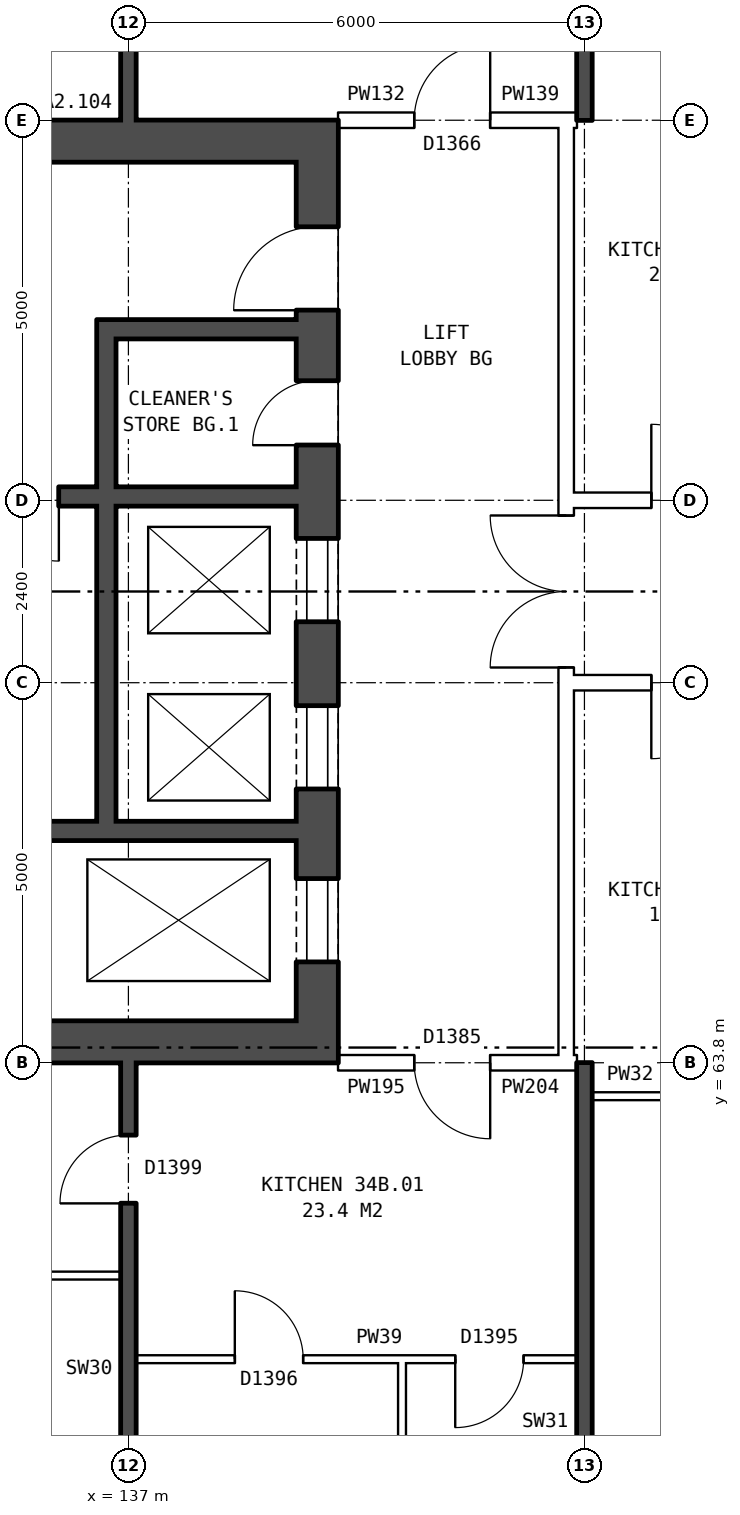
"""IFC4 building model, lengths in metres.
Left out: names, types, materials, properties, quantities, classifications, styles, units other than length and angle.
Written with IfcOpenShell. Run it as: python <this file> out.ifc"""

import sys

from ifc_helpers import new_model, si_unit, direction, frame, frame_2d, origin, place, context, subcontext, project, spatial, rectangle, extrude, element, fill, save


model = new_model("IFC4")
c1 = context("Model", 3, precision=1e-05, world=origin(), true_north=direction((0.0, 1.0)))
c2 = subcontext(c1, "Body", "Model", "MODEL_VIEW")
j1 = project(units=[si_unit("LENGTHUNIT", "METRE"), si_unit("PLANEANGLEUNIT", "RADIAN")], contexts=[c1])
p1 = place(None, origin())
s1 = spatial("IfcSite", under=j1, at=p1, CompositionType="ELEMENT")
p2 = place(p1, origin())
s2 = spatial("IfcBuilding", under=s1, at=p2, CompositionType="ELEMENT")
p3 = place(p2, frame((0.0, 0.0, 123.7)))
s3 = spatial("IfcBuildingStorey", under=s2, at=p3, CompositionType="ELEMENT", Elevation=123.7)
p4 = place(p3, frame((139.485, 63.8, 0.0), z_axis=(0.0, 0.0, 1.0), x_axis=(0.0, 1.0, 0.0)))
e1 = element("IfcWall", 1, at=p4, inside=s3, PredefinedType="SHEAR", context=c2, shape_type="SweptSolid", body=[
    extrude(rectangle(XDim=12.4, YDim=0.55, at=frame_2d((6.2, 0.0))), origin(), (0.0, 0.0, 1.0), 2.85),
])
p5 = place(p4, frame((1.325, 0.0, 0.0)))
e2 = element("IfcOpeningElement", 2, at=p5, cuts=e1, PredefinedType="OPENING", context=c2, shape_type="SweptSolid", body=[
    extrude(rectangle(XDim=1.1, YDim=2.1, at=frame_2d((0.55, 1.05))), frame((0.0, 0.285, 0.0), z_axis=(0.0, -1.0, 0.0), x_axis=(1.0, 0.0, 0.0)), (0.0, 0.0, 1.0), 0.57),
])
p6 = place(p4, frame((3.6, 0.0, 0.0)))
e3 = element("IfcOpeningElement", 3, at=p6, cuts=e1, PredefinedType="OPENING", context=c2, shape_type="SweptSolid", body=[
    extrude(rectangle(XDim=1.1, YDim=2.1, at=frame_2d((0.55, 1.05))), frame((0.0, 0.285, 0.0), z_axis=(0.0, -1.0, 0.0), x_axis=(1.0, 0.0, 0.0)), (0.0, 0.0, 1.0), 0.57),
])
p7 = place(p4, frame((5.8, 0.0, 0.0)))
e4 = element("IfcOpeningElement", 4, at=p7, cuts=e1, PredefinedType="OPENING", context=c2, shape_type="SweptSolid", body=[
    extrude(rectangle(XDim=1.1, YDim=2.1, at=frame_2d((0.55, 1.05))), frame((0.0, 0.285, 0.0), z_axis=(0.0, -1.0, 0.0), x_axis=(1.0, 0.0, 0.0)), (0.0, 0.0, 1.0), 0.57),
])
p8 = place(p4, frame((9.9, 0.0, 0.0)))
e5 = element("IfcOpeningElement", 5, at=p8, cuts=e1, PredefinedType="OPENING", context=c2, shape_type="SweptSolid", body=[
    extrude(rectangle(XDim=1.1, YDim=2.1, at=frame_2d((0.55, 1.05))), frame((0.0, 0.285, 0.0), z_axis=(0.0, -1.0, 0.0), x_axis=(1.0, 0.0, 0.0)), (0.0, 0.0, 1.0), 0.57),
])
p9 = place(p4, frame((8.125, 0.0, 0.0)))
e6 = element("IfcOpeningElement", 6, at=p9, cuts=e1, PredefinedType="OPENING", context=c2, shape_type="SweptSolid", body=[
    extrude(rectangle(XDim=0.85, YDim=2.1, at=frame_2d((0.425, 1.05))), frame((0.0, 0.285, 0.0), z_axis=(0.0, -1.0, 0.0), x_axis=(1.0, 0.0, 0.0)), (0.0, 0.0, 1.0), 0.57),
])
for number, where, z_axis, x_axis in (
    (7, (139.21, 64.075, 0.0), (0.0, 0.0, 1.0), (-1.0, 0.0, 0.0)),
    (8, (139.21, 75.925, 0.0), (0.0, 0.0, 1.0), (-1.0, 0.0, 0.0)),
):
    element("IfcWall", number, at=place(p3, frame(where, z_axis=z_axis, x_axis=x_axis)), inside=s3, PredefinedType="SHEAR", context=c2, shape_type="SweptSolid", body=[
        extrude(rectangle(XDim=7.3, YDim=0.55, at=frame_2d((3.65, 0.0))), origin(), (0.0, 0.0, 1.0), 2.85),
    ])
p10 = place(p3, frame((139.21, 66.85, 0.0), z_axis=(0.0, 0.0, 1.0), x_axis=(-1.0, 0.0, 0.0)))
e9 = element("IfcWall", 9, at=p10, inside=s3, PredefinedType="SHEAR", context=c2, shape_type="SweptSolid", body=[
    extrude(rectangle(XDim=4.475, YDim=0.25, at=frame_2d((2.237, 0.0))), origin(), (0.0, 0.0, 1.0), 2.85),
])
p11 = place(p3, frame((139.21, 71.25, 0.0), z_axis=(0.0, 0.0, 1.0), x_axis=(-1.0, 0.0, 0.0)))
e10 = element("IfcWall", 10, at=p11, inside=s3, PredefinedType="SHEAR", context=c2, shape_type="SweptSolid", body=[
    extrude(rectangle(XDim=7.3, YDim=0.25, at=frame_2d((3.65, 0.0))), origin(), (0.0, 0.0, 1.0), 2.85),
])
p12 = place(p11, frame((4.875, 0.0, 0.0)))
e11 = element("IfcOpeningElement", 11, at=p12, cuts=e10, PredefinedType="OPENING", context=c2, shape_type="SweptSolid", body=[
    extrude(rectangle(XDim=1.1, YDim=2.1, at=frame_2d((0.55, 1.05))), frame((0.0, 0.135, 0.0), z_axis=(0.0, -1.0, 0.0), x_axis=(1.0, 0.0, 0.0)), (0.0, 0.0, 1.0), 0.27),
])
p13 = place(p11, frame((3.125, 0.0, 0.0)))
e12 = element("IfcOpeningElement", 12, at=p13, cuts=e10, PredefinedType="OPENING", context=c2, shape_type="SweptSolid", body=[
    extrude(rectangle(XDim=0.85, YDim=2.1, at=frame_2d((0.425, 1.05))), frame((0.0, 0.135, 0.0), z_axis=(0.0, -1.0, 0.0), x_axis=(1.0, 0.0, 0.0)), (0.0, 0.0, 1.0), 0.27),
])
p14 = place(p3, frame((139.21, 73.45, 0.0), z_axis=(0.0, 0.0, 1.0), x_axis=(-1.0, 0.0, 0.0)))
e13 = element("IfcWall", 13, at=p14, inside=s3, PredefinedType="SHEAR", context=c2, shape_type="SweptSolid", body=[
    extrude(rectangle(XDim=2.375, YDim=0.25, at=frame_2d((1.188, 0.0))), origin(), (0.0, 0.0, 1.0), 2.85),
])
p15 = place(p3, frame((136.71, 66.975, 0.0), z_axis=(0.0, 0.0, 1.0), x_axis=(0.0, 1.0, 0.0)))
e14 = element("IfcWall", 14, at=p15, inside=s3, PredefinedType="SHEAR", context=c2, shape_type="SweptSolid", body=[
    extrude(rectangle(XDim=4.15, YDim=0.25, at=frame_2d((2.075, 0.0))), origin(), (0.0, 0.0, 1.0), 2.85),
])
p16 = place(p3, frame((136.71, 71.375, 0.0), z_axis=(0.0, 0.0, 1.0), x_axis=(0.0, 1.0, 0.0)))
e15 = element("IfcWall", 15, at=p16, inside=s3, PredefinedType="SHEAR", context=c2, shape_type="SweptSolid", body=[
    extrude(rectangle(XDim=2.2, YDim=0.25, at=frame_2d((1.1, 0.0))), origin(), (0.0, 0.0, 1.0), 2.85),
])
p17 = place(p3, frame((142.76, 63.9, 0.0), z_axis=(0.0, 0.0, 1.0), x_axis=(0.0, 1.0, 0.0)))
e16 = element("IfcWall", 16, at=p17, inside=s3, PredefinedType="PARTITIONING", context=c2, shape_type="SweptSolid", body=[
    extrude(rectangle(XDim=12.2, YDim=0.2, at=frame_2d((6.1, 0.0))), origin(), (0.0, 0.0, 1.0), 2.85),
])
p18 = place(p17, frame((5.1, 0.0, 0.0)))
e17 = element("IfcOpeningElement", 17, at=p18, cuts=e16, PredefinedType="OPENING", context=c2, shape_type="SweptSolid", body=[
    extrude(rectangle(XDim=2.0, YDim=2.1, at=frame_2d((1.0, 1.05))), frame((0.0, 0.11, 0.0), z_axis=(0.0, -1.0, 0.0), x_axis=(1.0, 0.0, 0.0)), (0.0, 0.0, 1.0), 0.22),
])
p19 = place(p3, frame((137.1, 59.9, 0.0), z_axis=(0.0, 0.0, 1.0), x_axis=(1.0, 0.0, 0.0)))
e18 = element("IfcWall", 18, at=p19, inside=s3, PredefinedType="PARTITIONING", context=c2, shape_type="SweptSolid", body=[
    extrude(rectangle(XDim=5.8, YDim=0.1, at=frame_2d((2.9, 0.0))), origin(), (0.0, 0.0, 1.0), 2.85),
])
p20 = place(p19, frame((1.3, 0.0, 0.0)))
e19 = element("IfcOpeningElement", 19, at=p20, cuts=e18, PredefinedType="OPENING", context=c2, shape_type="SweptSolid", body=[
    extrude(rectangle(XDim=0.9, YDim=2.1, at=frame_2d((0.45, 1.05))), frame((0.0, 0.06, 0.0), z_axis=(0.0, -1.0, 0.0), x_axis=(1.0, 0.0, 0.0)), (0.0, 0.0, 1.0), 0.12),
])
p21 = place(p19, frame((4.2, 0.0, 0.0)))
e20 = element("IfcOpeningElement", 20, at=p21, cuts=e18, PredefinedType="OPENING", context=c2, shape_type="SweptSolid", body=[
    extrude(rectangle(XDim=0.9, YDim=2.1, at=frame_2d((0.45, 1.05))), frame((0.0, 0.06, 0.0), z_axis=(0.0, -1.0, 0.0), x_axis=(1.0, 0.0, 0.0)), (0.0, 0.0, 1.0), 0.12),
])
p22 = place(p3, frame((131.36, 61.0, 0.0), z_axis=(0.0, 0.0, 1.0), x_axis=(1.0, 0.0, 0.0)))
e21 = element("IfcWall", 21, at=p22, inside=s3, PredefinedType="PARTITIONING", context=c2, shape_type="SweptSolid", body=[
    extrude(rectangle(XDim=5.54, YDim=0.1, at=frame_2d((2.77, 0.0))), origin(), (0.0, 0.0, 1.0), 2.85),
])
p23 = place(p3, frame((143.1, 63.36, 0.0), z_axis=(0.0, 0.0, 1.0), x_axis=(1.0, 0.0, 0.0)))
e22 = element("IfcWall", 22, at=p23, inside=s3, PredefinedType="PARTITIONING", context=c2, shape_type="SweptSolid", body=[
    extrude(rectangle(XDim=2.9, YDim=0.1, at=frame_2d((1.45, 0.0))), origin(), (0.0, 0.0, 1.0), 2.85),
])
p24 = place(p23, frame((1.0, 0.0, 0.0)))
e23 = element("IfcOpeningElement", 23, at=p24, cuts=e22, PredefinedType="OPENING", context=c2, shape_type="SweptSolid", body=[
    extrude(rectangle(XDim=0.9, YDim=2.1, at=frame_2d((0.45, 1.05))), frame((0.0, 0.06, 0.0), z_axis=(0.0, -1.0, 0.0), x_axis=(1.0, 0.0, 0.0)), (0.0, 0.0, 1.0), 0.12),
])
p25 = place(p3, frame((139.76, 63.8, 0.0), z_axis=(0.0, 0.0, 1.0), x_axis=(1.0, 0.0, 0.0)))
e24 = element("IfcWall", 24, at=p25, inside=s3, PredefinedType="PARTITIONING", context=c2, shape_type="SweptSolid", body=[
    extrude(rectangle(XDim=3.0, YDim=0.2, at=frame_2d((1.5, 0.0))), origin(), (0.0, 0.0, 1.0), 2.85),
])
p26 = place(p25, frame((1.0, 0.0, 0.0)))
e25 = element("IfcOpeningElement", 25, at=p26, cuts=e24, PredefinedType="OPENING", context=c2, shape_type="SweptSolid", body=[
    extrude(rectangle(XDim=1.0, YDim=2.1, at=frame_2d((0.5, 1.05))), frame((0.0, 0.11, 0.0), z_axis=(0.0, -1.0, 0.0), x_axis=(1.0, 0.0, 0.0)), (0.0, 0.0, 1.0), 0.22),
])
p27 = place(p3, frame((142.76, 63.8, 0.0), z_axis=(0.0, 0.0, 1.0), x_axis=(1.0, 0.0, 0.0)))
e26 = element("IfcWall", 26, at=p27, inside=s3, PredefinedType="PARTITIONING", context=c2, shape_type="SweptSolid", body=[
    extrude(rectangle(XDim=0.14, YDim=0.2, at=frame_2d((0.07, 0.0))), origin(), (0.0, 0.0, 1.0), 2.85),
])
p28 = place(p3, frame((142.76, 68.8, 0.0), z_axis=(0.0, 0.0, 1.0), x_axis=(1.0, 0.0, 0.0)))
e27 = element("IfcWall", 27, at=p28, inside=s3, PredefinedType="PARTITIONING", context=c2, shape_type="SweptSolid", body=[
    extrude(rectangle(XDim=14.48, YDim=0.2, at=frame_2d((7.24, 0.0))), origin(), (0.0, 0.0, 1.0), 2.85),
])
p29 = place(p28, frame((1.12, 0.0, 0.0)))
e28 = element("IfcOpeningElement", 28, at=p29, cuts=e27, PredefinedType="OPENING", context=c2, shape_type="SweptSolid", body=[
    extrude(rectangle(XDim=1.0, YDim=2.1, at=frame_2d((0.5, 1.05))), frame((0.0, 0.11, 0.0), z_axis=(0.0, -1.0, 0.0), x_axis=(1.0, 0.0, 0.0)), (0.0, 0.0, 1.0), 0.22),
])
p30 = place(p28, frame((7.24, 0.0, 0.0)))
e29 = element("IfcOpeningElement", 29, at=p30, cuts=e27, PredefinedType="OPENING", context=c2, shape_type="SweptSolid", body=[
    extrude(rectangle(XDim=1.0, YDim=2.1, at=frame_2d((0.5, 1.05))), frame((0.0, 0.11, 0.0), z_axis=(0.0, -1.0, 0.0), x_axis=(1.0, 0.0, 0.0)), (0.0, 0.0, 1.0), 0.22),
])
p31 = place(p3, frame((142.76, 71.2, 0.0), z_axis=(0.0, 0.0, 1.0), x_axis=(1.0, 0.0, 0.0)))
e30 = element("IfcWall", 30, at=p31, inside=s3, PredefinedType="PARTITIONING", context=c2, shape_type="SweptSolid", body=[
    extrude(rectangle(XDim=14.48, YDim=0.2, at=frame_2d((7.24, 0.0))), origin(), (0.0, 0.0, 1.0), 2.85),
])
p32 = place(p31, frame((1.12, 0.0, 0.0)))
e31 = element("IfcOpeningElement", 31, at=p32, cuts=e30, PredefinedType="OPENING", context=c2, shape_type="SweptSolid", body=[
    extrude(rectangle(XDim=1.0, YDim=2.1, at=frame_2d((0.5, 1.05))), frame((0.0, 0.11, 0.0), z_axis=(0.0, -1.0, 0.0), x_axis=(1.0, 0.0, 0.0)), (0.0, 0.0, 1.0), 0.22),
])
p33 = place(p31, frame((10.24, 0.0, 0.0)))
e32 = element("IfcOpeningElement", 32, at=p33, cuts=e30, PredefinedType="OPENING", context=c2, shape_type="SweptSolid", body=[
    extrude(rectangle(XDim=1.0, YDim=2.1, at=frame_2d((0.5, 1.05))), frame((0.0, 0.11, 0.0), z_axis=(0.0, -1.0, 0.0), x_axis=(1.0, 0.0, 0.0)), (0.0, 0.0, 1.0), 0.22),
])
p34 = place(p3, frame((139.76, 76.2, 0.0), z_axis=(0.0, 0.0, 1.0), x_axis=(1.0, 0.0, 0.0)))
e33 = element("IfcWall", 33, at=p34, inside=s3, PredefinedType="PARTITIONING", context=c2, shape_type="SweptSolid", body=[
    extrude(rectangle(XDim=3.0, YDim=0.2, at=frame_2d((1.5, 0.0))), origin(), (0.0, 0.0, 1.0), 2.85),
])
p35 = place(p34, frame((1.0, 0.0, 0.0)))
e34 = element("IfcOpeningElement", 34, at=p35, cuts=e33, PredefinedType="OPENING", context=c2, shape_type="SweptSolid", body=[
    extrude(rectangle(XDim=1.0, YDim=2.1, at=frame_2d((0.5, 1.05))), frame((0.0, 0.11, 0.0), z_axis=(0.0, -1.0, 0.0), x_axis=(1.0, 0.0, 0.0)), (0.0, 0.0, 1.0), 0.22),
])
p36 = place(p3, frame((142.76, 76.2, 0.0), z_axis=(0.0, 0.0, 1.0), x_axis=(1.0, 0.0, 0.0)))
e35 = element("IfcWall", 35, at=p36, inside=s3, PredefinedType="PARTITIONING", context=c2, shape_type="SweptSolid", body=[
    extrude(rectangle(XDim=0.14, YDim=0.2, at=frame_2d((0.07, 0.0))), origin(), (0.0, 0.0, 1.0), 2.85),
])
p37 = place(p3, frame((137.0, 54.36, 0.0), z_axis=(0.0, 0.0, 1.0), x_axis=(0.0, 1.0, 0.0)))
e36 = element("IfcWall", 36, at=p37, inside=s3, PredefinedType="SOLIDWALL", context=c2, shape_type="SweptSolid", body=[
    extrude(rectangle(XDim=9.44, YDim=0.2, at=frame_2d((4.72, 0.0))), origin(), (0.0, 0.0, 1.0), 2.85),
])
p38 = place(p37, frame((2.32, 0.0, 0.0)))
e37 = element("IfcOpeningElement", 37, at=p38, cuts=e36, PredefinedType="OPENING", context=c2, shape_type="SweptSolid", body=[
    extrude(rectangle(XDim=0.9, YDim=2.1, at=frame_2d((0.45, 1.05))), frame((0.0, 0.11, 0.0), z_axis=(0.0, -1.0, 0.0), x_axis=(1.0, 0.0, 0.0)), (0.0, 0.0, 1.0), 0.22),
])
p39 = place(p37, frame((7.59, 0.0, 0.0)))
e38 = element("IfcOpeningElement", 38, at=p39, cuts=e36, PredefinedType="OPENING", context=c2, shape_type="SweptSolid", body=[
    extrude(rectangle(XDim=0.9, YDim=2.1, at=frame_2d((0.45, 1.05))), frame((0.0, 0.11, 0.0), z_axis=(0.0, -1.0, 0.0), x_axis=(1.0, 0.0, 0.0)), (0.0, 0.0, 1.0), 0.22),
])
p40 = place(p3, frame((137.0, 76.2, 0.0), z_axis=(0.0, 0.0, 1.0), x_axis=(0.0, 1.0, 0.0)))
e39 = element("IfcWall", 39, at=p40, inside=s3, PredefinedType="SOLIDWALL", context=c2, shape_type="SweptSolid", body=[
    extrude(rectangle(XDim=9.44, YDim=0.2, at=frame_2d((4.72, 0.0))), origin(), (0.0, 0.0, 1.0), 2.85),
])
p41 = place(p40, frame((6.22, 0.0, 0.0)))
e40 = element("IfcOpeningElement", 40, at=p41, cuts=e39, PredefinedType="OPENING", context=c2, shape_type="SweptSolid", body=[
    extrude(rectangle(XDim=0.9, YDim=2.1, at=frame_2d((0.45, 1.05))), frame((0.0, 0.11, 0.0), z_axis=(0.0, -1.0, 0.0), x_axis=(1.0, 0.0, 0.0)), (0.0, 0.0, 1.0), 0.22),
])
p42 = place(p40, frame((0.95, 0.0, 0.0)))
e41 = element("IfcOpeningElement", 41, at=p42, cuts=e39, PredefinedType="OPENING", context=c2, shape_type="SweptSolid", body=[
    extrude(rectangle(XDim=0.9, YDim=2.1, at=frame_2d((0.45, 1.05))), frame((0.0, 0.11, 0.0), z_axis=(0.0, -1.0, 0.0), x_axis=(1.0, 0.0, 0.0)), (0.0, 0.0, 1.0), 0.22),
])
p43 = place(p3, frame((140.6, 57.45, 0.0), z_axis=(0.0, 0.0, 1.0), x_axis=(0.0, 1.0, 0.0)))
e42 = element("IfcWall", 42, at=p43, inside=s3, PredefinedType="PARTITIONING", context=c2, shape_type="SweptSolid", body=[
    extrude(rectangle(XDim=2.4, YDim=0.1, at=frame_2d((1.2, 0.0))), origin(), (0.0, 0.0, 1.0), 2.85),
])
for number, where, z_axis, x_axis in (
    (43, (143.0, 54.36, 0.0), (0.0, 0.0, 1.0), (0.0, 1.0, 0.0)),
    (44, (143.0, 76.2, 0.0), (0.0, 0.0, 1.0), (0.0, 1.0, 0.0)),
):
    element("IfcWall", number, at=place(p3, frame(where, z_axis=z_axis, x_axis=x_axis)), inside=s3, PredefinedType="SOLIDWALL", context=c2, shape_type="SweptSolid", body=[
        extrude(rectangle(XDim=9.44, YDim=0.2, at=frame_2d((4.72, 0.0))), origin(), (0.0, 0.0, 1.0), 2.85),
    ])
p44 = place(p5, origin())
e45 = element("IfcDoor", 45, at=p44, inside=s3, OperationType="DOUBLE_DOOR_SLIDING", PredefinedType="DOOR", context=c2, shape_type="SweptSolid", body=[
    extrude(rectangle(XDim=1.1, YDim=2.1, at=frame_2d((0.55, 1.05))), frame((0.0, 0.26, 0.0), z_axis=(0.0, -1.0, 0.0), x_axis=(1.0, 0.0, 0.0)), (0.0, 0.0, 1.0), 0.05),
])
fill(e2, e45)
p45 = place(p6, origin())
e46 = element("IfcDoor", 46, at=p45, inside=s3, OperationType="DOUBLE_DOOR_SLIDING", PredefinedType="DOOR", context=c2, shape_type="SweptSolid", body=[
    extrude(rectangle(XDim=1.1, YDim=2.1, at=frame_2d((0.55, 1.05))), frame((0.0, 0.26, 0.0), z_axis=(0.0, -1.0, 0.0), x_axis=(1.0, 0.0, 0.0)), (0.0, 0.0, 1.0), 0.05),
])
fill(e3, e46)
p46 = place(p7, origin())
e47 = element("IfcDoor", 47, at=p46, inside=s3, OperationType="DOUBLE_DOOR_SLIDING", PredefinedType="DOOR", context=c2, shape_type="SweptSolid", body=[
    extrude(rectangle(XDim=1.1, YDim=2.1, at=frame_2d((0.55, 1.05))), frame((0.0, 0.26, 0.0), z_axis=(0.0, -1.0, 0.0), x_axis=(1.0, 0.0, 0.0)), (0.0, 0.0, 1.0), 0.05),
])
fill(e4, e47)
p47 = place(p8, origin())
e48 = element("IfcDoor", 48, at=p47, inside=s3, OperationType="SINGLE_SWING_LEFT", PredefinedType="DOOR", context=c2, shape_type="SweptSolid", body=[
    extrude(rectangle(XDim=1.1, YDim=2.1, at=frame_2d((0.55, 1.05))), frame((0.0, 0.26, 0.0), z_axis=(0.0, -1.0, 0.0), x_axis=(1.0, 0.0, 0.0)), (0.0, 0.0, 1.0), 0.05),
])
fill(e5, e48)
p48 = place(p9, origin())
e49 = element("IfcDoor", 49, at=p48, inside=s3, OperationType="SINGLE_SWING_LEFT", PredefinedType="DOOR", context=c2, shape_type="SweptSolid", body=[
    extrude(rectangle(XDim=0.85, YDim=2.1, at=frame_2d((0.425, 1.05))), frame((0.0, 0.26, 0.0), z_axis=(0.0, -1.0, 0.0), x_axis=(1.0, 0.0, 0.0)), (0.0, 0.0, 1.0), 0.05),
])
fill(e6, e49)
p49 = place(p13, origin())
e50 = element("IfcDoor", 50, at=p49, inside=s3, OperationType="SINGLE_SWING_LEFT", PredefinedType="DOOR", context=c2, shape_type="SweptSolid", body=[
    extrude(rectangle(XDim=0.85, YDim=2.1, at=frame_2d((0.425, 1.05))), frame((0.0, 0.025, 0.0), z_axis=(0.0, -1.0, 0.0), x_axis=(1.0, 0.0, 0.0)), (0.0, 0.0, 1.0), 0.05),
])
fill(e12, e50)
p50 = place(p18, origin())
e51 = element("IfcDoor", 51, at=p50, inside=s3, OperationType="DOUBLE_DOOR_SINGLE_SWING", PredefinedType="DOOR", context=c2, shape_type="SweptSolid", body=[
    extrude(rectangle(XDim=2.0, YDim=2.1, at=frame_2d((1.0, 1.05))), frame((0.0, 0.025, 0.0), z_axis=(0.0, -1.0, 0.0), x_axis=(1.0, 0.0, 0.0)), (0.0, 0.0, 1.0), 0.05),
])
fill(e17, e51)
p51 = place(p39, origin())
e52 = element("IfcDoor", 52, at=p51, inside=s3, OperationType="SINGLE_SWING_LEFT", PredefinedType="DOOR", context=c2, shape_type="SweptSolid", body=[
    extrude(rectangle(XDim=0.9, YDim=2.1, at=frame_2d((0.45, 1.05))), frame((0.0, 0.025, 0.0), z_axis=(0.0, -1.0, 0.0), x_axis=(1.0, 0.0, 0.0)), (0.0, 0.0, 1.0), 0.05),
])
fill(e38, e52)
p52 = place(p26, frame((1.0, 0.0, 0.0), z_axis=(0.0, 0.0, 1.0), x_axis=(-1.0, 0.0, 0.0)))
e53 = element("IfcDoor", 53, at=p52, inside=s3, OperationType="SINGLE_SWING_LEFT", PredefinedType="DOOR", context=c2, shape_type="SweptSolid", body=[
    extrude(rectangle(XDim=1.0, YDim=2.1, at=frame_2d((0.5, 1.05))), frame((0.0, 0.025, 0.0), z_axis=(0.0, -1.0, 0.0), x_axis=(1.0, 0.0, 0.0)), (0.0, 0.0, 1.0), 0.05),
])
fill(e25, e53)
p53 = place(p20, origin())
e54 = element("IfcDoor", 54, at=p53, inside=s3, OperationType="SINGLE_SWING_LEFT", PredefinedType="DOOR", context=c2, shape_type="SweptSolid", body=[
    extrude(rectangle(XDim=0.9, YDim=2.1, at=frame_2d((0.45, 1.05))), frame((0.0, 0.025, 0.0), z_axis=(0.0, -1.0, 0.0), x_axis=(1.0, 0.0, 0.0)), (0.0, 0.0, 1.0), 0.05),
])
fill(e19, e54)
p54 = place(p21, frame((0.9, 0.0, 0.0), z_axis=(0.0, 0.0, 1.0), x_axis=(-1.0, 0.0, 0.0)))
e55 = element("IfcDoor", 55, at=p54, inside=s3, OperationType="SINGLE_SWING_RIGHT", PredefinedType="DOOR", context=c2, shape_type="SweptSolid", body=[
    extrude(rectangle(XDim=0.9, YDim=2.1, at=frame_2d((0.45, 1.05))), frame((0.0, 0.025, 0.0), z_axis=(0.0, -1.0, 0.0), x_axis=(1.0, 0.0, 0.0)), (0.0, 0.0, 1.0), 0.05),
])
fill(e20, e55)
p55 = place(p35, origin())
e56 = element("IfcDoor", 56, at=p55, inside=s3, OperationType="SINGLE_SWING_RIGHT", PredefinedType="DOOR", context=c2, shape_type="SweptSolid", body=[
    extrude(rectangle(XDim=1.0, YDim=2.1, at=frame_2d((0.5, 1.05))), frame((0.0, 0.025, 0.0), z_axis=(0.0, -1.0, 0.0), x_axis=(1.0, 0.0, 0.0)), (0.0, 0.0, 1.0), 0.05),
])
fill(e34, e56)
p56 = place(p29, frame((1.0, 0.0, 0.0), z_axis=(0.0, 0.0, 1.0), x_axis=(-1.0, 0.0, 0.0)))
e57 = element("IfcDoor", 57, at=p56, inside=s3, OperationType="SINGLE_SWING_RIGHT", PredefinedType="DOOR", context=c2, shape_type="SweptSolid", body=[
    extrude(rectangle(XDim=1.0, YDim=2.1, at=frame_2d((0.5, 1.05))), frame((0.0, 0.025, 0.0), z_axis=(0.0, -1.0, 0.0), x_axis=(1.0, 0.0, 0.0)), (0.0, 0.0, 1.0), 0.05),
])
fill(e28, e57)
p57 = place(p32, origin())
e58 = element("IfcDoor", 58, at=p57, inside=s3, OperationType="SINGLE_SWING_LEFT", PredefinedType="DOOR", context=c2, shape_type="SweptSolid", body=[
    extrude(rectangle(XDim=1.0, YDim=2.1, at=frame_2d((0.5, 1.05))), frame((0.0, 0.025, 0.0), z_axis=(0.0, -1.0, 0.0), x_axis=(1.0, 0.0, 0.0)), (0.0, 0.0, 1.0), 0.05),
])
fill(e31, e58)
save(model, sys.argv[1])
